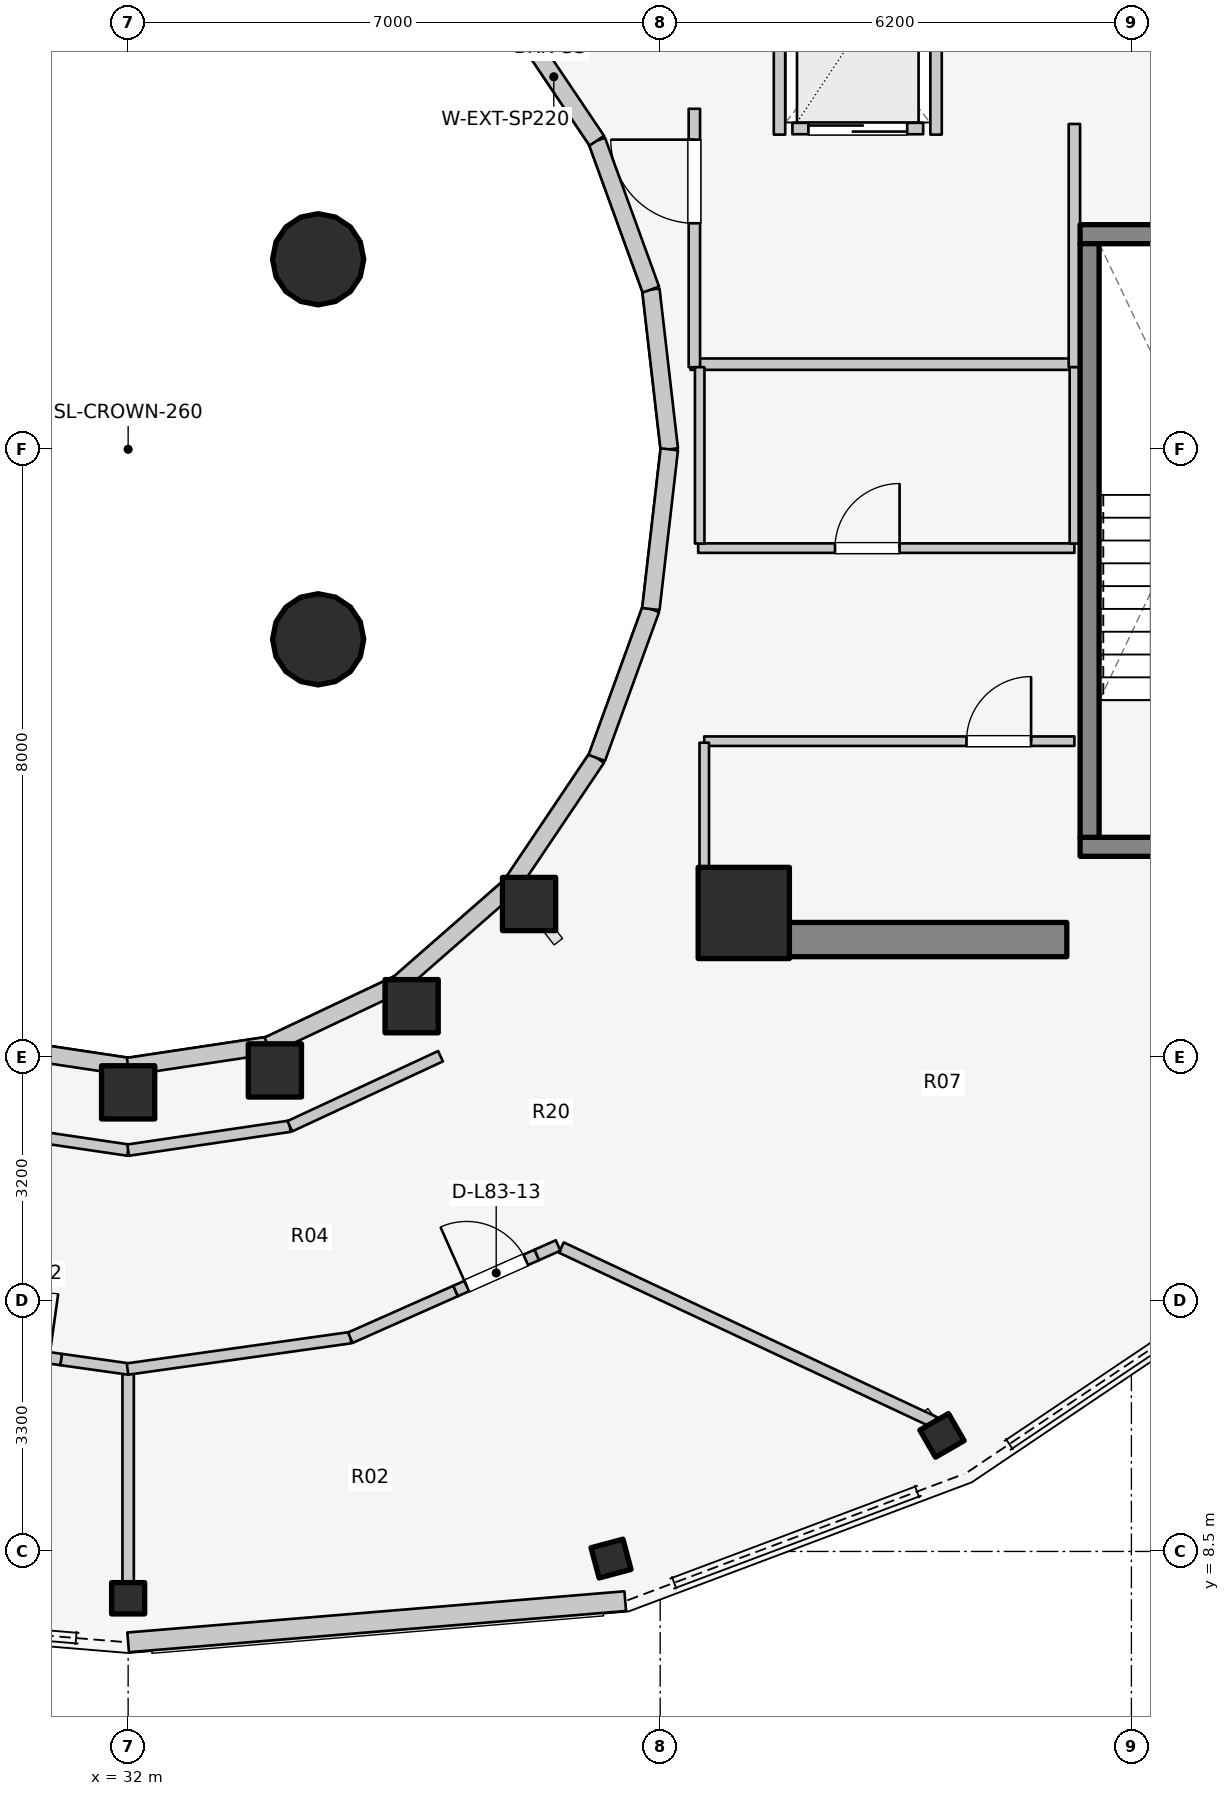
"""IFC4 building model, lengths in metres.
Left out: names, types, materials, properties, quantities, classifications, styles, units other than length and angle.
Written with IfcOpenShell. Run it as: python <this file> out.ifc"""

import sys

from ifc_helpers import new_model, si_unit, direction, frame, frame_2d, origin, origin_2d, place, context, subcontext, project, spatial, rectangle, hollow_circle, i_section, extrude, element, fill, save


model = new_model("IFC4")
c1 = context("Model", 3, precision=1e-05, world=origin(), true_north=direction((0.0, 1.0)))
c2 = subcontext(c1, "Body", "Model", "MODEL_VIEW")
j1 = project(units=[si_unit("LENGTHUNIT", "METRE"), si_unit("PLANEANGLEUNIT", "RADIAN")], contexts=[c1])
p1 = place(None, origin())
s1 = spatial("IfcSite", under=j1, at=p1, CompositionType="ELEMENT")
p2 = place(p1, origin())
s2 = spatial("IfcBuilding", under=s1, at=p2, CompositionType="ELEMENT")
p3 = place(p2, frame((0.0, 0.0, 273.2)))
s3 = spatial("IfcBuildingStorey", under=s2, at=p3, CompositionType="ELEMENT", Elevation=273.2)
p4 = place(p3, frame((39.85, 16.55, 0.0), z_axis=(0.0, 0.0, 1.0), x_axis=(1.0, 0.0, 0.0)))
e1 = element("IfcWall", 1, at=p4, inside=s3, PredefinedType="SHEAR", context=c2, shape_type="SweptSolid", body=[
    extrude(rectangle(XDim=4.5, YDim=0.45, at=frame_2d((2.25, 0.0))), origin(), (0.0, 0.0, 1.0), 3.2),
])
p5 = place(p3, frame((44.525, 17.77, 0.0), z_axis=(0.0, 0.0, 1.0), x_axis=(1.0, 0.0, 0.0)))
e2 = element("IfcWall", 2, at=p5, inside=s3, PredefinedType="SOLIDWALL", context=c2, shape_type="SweptSolid", body=[
    extrude(rectangle(XDim=3.37, YDim=0.25, at=frame_2d((1.685, 0.0))), origin(), (0.0, 0.0, 1.0), 3.2),
])
p6 = place(p5, frame((1.135, 0.0, 0.0)))
e3 = element("IfcOpeningElement", 3, at=p6, cuts=e2, PredefinedType="OPENING", context=c2, shape_type="SweptSolid", body=[
    extrude(rectangle(XDim=1.1, YDim=2.1, at=frame_2d((0.55, 1.05))), frame((0.0, 0.135, 0.0), z_axis=(0.0, -1.0, 0.0), x_axis=(1.0, 0.0, 0.0)), (0.0, 0.0, 1.0), 0.27),
])
p7 = place(p3, frame((44.525, 25.83, 0.0), z_axis=(0.0, 0.0, 1.0), x_axis=(1.0, 0.0, 0.0)))
e4 = element("IfcWall", 4, at=p7, inside=s3, PredefinedType="SOLIDWALL", context=c2, shape_type="SweptSolid", body=[
    extrude(rectangle(XDim=3.37, YDim=0.25, at=frame_2d((1.685, 0.0))), origin(), (0.0, 0.0, 1.0), 3.2),
])
p8 = place(p3, frame((44.65, 17.895, 0.0), z_axis=(0.0, 0.0, 1.0), x_axis=(0.0, 1.0, 0.0)))
e5 = element("IfcWall", 5, at=p8, inside=s3, PredefinedType="SOLIDWALL", context=c2, shape_type="SweptSolid", body=[
    extrude(rectangle(XDim=7.81, YDim=0.25, at=frame_2d((3.905, 0.0))), origin(), (0.0, 0.0, 1.0), 3.2),
])
p9 = place(p3, frame((40.1, 16.9, 0.0), z_axis=(0.0, 0.0, 1.0), x_axis=(1.0, 0.0, 0.0)))
e6 = element("IfcColumn", 6, at=p9, inside=s3, PredefinedType="COLUMN", context=c2, shape_type="SweptSolid", body=[
    extrude(rectangle(XDim=1.2, YDim=1.2, at=origin_2d()), origin(), (0.0, 0.0, 1.0), 3.2),
])
p10 = place(p3, frame((32.0, 14.54, 0.0), z_axis=(0.0, 0.0, 1.0), x_axis=(1.0, 0.0, 0.0)))
e7 = element("IfcColumn", 7, at=p10, inside=s3, PredefinedType="COLUMN", context=c2, shape_type="SweptSolid", body=[
    extrude(rectangle(XDim=0.7, YDim=0.7, at=origin_2d()), origin(), (0.0, 0.0, 1.0), 3.2),
])
p11 = place(p3, frame((32.0, 7.884, 0.0), z_axis=(0.0, 0.0, 1.0), x_axis=(0.0, -1.0, 0.0)))
e8 = element("IfcColumn", 8, at=p11, inside=s3, PredefinedType="COLUMN", context=c2, shape_type="SweptSolid", body=[
    extrude(i_section(OverallWidth=0.412, OverallDepth=0.435, WebThickness=0.036, FlangeThickness=0.057, FilletRadius=0.025, at=origin_2d()), origin(), (0.0, 0.0, 1.0), 3.2),
])
p12 = place(p3, frame((33.931, 14.828, 0.0), z_axis=(0.0, 0.0, 1.0), x_axis=(1.0, 0.0, 0.0)))
e9 = element("IfcColumn", 9, at=p12, inside=s3, PredefinedType="COLUMN", context=c2, shape_type="SweptSolid", body=[
    extrude(rectangle(XDim=0.7, YDim=0.7, at=origin_2d()), origin(), (0.0, 0.0, 1.0), 3.2),
])
p13 = place(p3, frame((38.354, 8.406, 0.0), z_axis=(0.0, 0.0, 1.0), x_axis=(0.258819045103, -0.965925826289, 0.0)))
e10 = element("IfcColumn", 10, at=p13, inside=s3, PredefinedType="COLUMN", context=c2, shape_type="SweptSolid", body=[
    extrude(i_section(OverallWidth=0.412, OverallDepth=0.435, WebThickness=0.036, FlangeThickness=0.057, FilletRadius=0.025, at=origin_2d()), origin(), (0.0, 0.0, 1.0), 3.2),
])
p14 = place(p3, frame((35.73, 15.673, 0.0), z_axis=(0.0, 0.0, 1.0), x_axis=(1.0, 0.0, 0.0)))
e11 = element("IfcColumn", 11, at=p14, inside=s3, PredefinedType="COLUMN", context=c2, shape_type="SweptSolid", body=[
    extrude(rectangle(XDim=0.7, YDim=0.7, at=origin_2d()), origin(), (0.0, 0.0, 1.0), 3.2),
])
p15 = place(p3, frame((42.708, 10.027, 0.0), z_axis=(0.0, 0.0, 1.0), x_axis=(0.5, -0.866025403784, 0.0)))
e12 = element("IfcColumn", 12, at=p15, inside=s3, PredefinedType="COLUMN", context=c2, shape_type="SweptSolid", body=[
    extrude(i_section(OverallWidth=0.412, OverallDepth=0.435, WebThickness=0.036, FlangeThickness=0.057, FilletRadius=0.025, at=origin_2d()), origin(), (0.0, 0.0, 1.0), 3.2),
])
p16 = place(p3, frame((37.275, 17.018, 0.0), z_axis=(0.0, 0.0, 1.0), x_axis=(1.0, 0.0, 0.0)))
e13 = element("IfcColumn", 13, at=p16, inside=s3, PredefinedType="COLUMN", context=c2, shape_type="SweptSolid", body=[
    extrude(rectangle(XDim=0.7, YDim=0.7, at=origin_2d()), origin(), (0.0, 0.0, 1.0), 3.2),
])
for number, where, z_axis, x_axis in (
    (14, (34.5, 20.5, 0.0), (0.0, 0.0, 1.0), (1.0, 0.0, 0.0)),
    (15, (34.5, 25.5, 0.0), (0.0, 0.0, 1.0), (1.0, 0.0, 0.0)),
):
    element("IfcColumn", number, at=place(p3, frame(where, z_axis=z_axis, x_axis=x_axis)), inside=s3, PredefinedType="PILASTER", context=c2, shape_type="SweptSolid", body=[
        extrude(hollow_circle(Radius=0.6, WallThickness=0.032, at=origin_2d()), origin(), (0.0, 0.0, 1.0), 3.2),
    ])
p17 = place(p3, frame((39.12, 23.0, 0.0), z_axis=(0.0, 0.0, 1.0), x_axis=(-0.114711713601, 0.993398823617, 0.0)))
e16 = element("IfcWall", 16, at=p17, inside=s3, PredefinedType="STANDARD", context=c2, shape_type="SweptSolid", body=[
    extrude(rectangle(XDim=2.115, YDim=0.23, at=frame_2d((1.058, 0.0))), origin(), (0.0, 0.0, 1.0), 2.9),
])
p18 = place(p3, frame((38.877, 25.102, 0.0), z_axis=(0.0, 0.0, 1.0), x_axis=(-0.341423187295, 0.93990968033, 0.0)))
e17 = element("IfcWall", 17, at=p18, inside=s3, PredefinedType="STANDARD", context=c2, shape_type="SweptSolid", body=[
    extrude(rectangle(XDim=2.084, YDim=0.23, at=frame_2d((1.042, 0.0))), origin(), (0.0, 0.0, 1.0), 2.9),
])
p19 = place(p3, frame((38.166, 27.06, 0.0), z_axis=(0.0, 0.0, 1.0), x_axis=(-0.558197800898, 0.829707909492, 0.0)))
e18 = element("IfcWall", 18, at=p19, inside=s3, PredefinedType="STANDARD", context=c2, shape_type="SweptSolid", body=[
    extrude(rectangle(XDim=2.027, YDim=0.23, at=frame_2d((1.013, 0.0))), origin(), (0.0, 0.0, 1.0), 1.32),
])
for number, where, z_axis, x_axis in (
    (19, (30.157, 15.157, 0.0), (0.0, 0.0, 1.0), (0.989, -0.149, 0.0)),
    (20, (32.0, 14.88, 0.0), (0.0, 0.0, 1.0), (0.989, 0.149, 0.0)),
):
    element("IfcWall", number, at=place(p3, frame(where, z_axis=z_axis, x_axis=x_axis)), inside=s3, PredefinedType="STANDARD", context=c2, shape_type="SweptSolid", body=[
        extrude(rectangle(XDim=1.864, YDim=0.23, at=frame_2d((0.932, 0.0))), origin(), (0.0, 0.0, 1.0), 1.32),
    ])
p20 = place(p3, frame((33.843, 15.157, 0.0), z_axis=(0.0, 0.0, 1.0), x_axis=(0.904179699603, 0.427152280606, 0.0)))
e21 = element("IfcWall", 21, at=p20, inside=s3, PredefinedType="STANDARD", context=c2, shape_type="SweptSolid", body=[
    extrude(rectangle(XDim=1.899, YDim=0.23, at=frame_2d((0.95, 0.0))), origin(), (0.0, 0.0, 1.0), 1.32),
])
p21 = place(p3, frame((35.56, 15.968, 0.0), z_axis=(0.0, 0.0, 1.0), x_axis=(0.752576694707, 0.658504607869, 0.0)))
e22 = element("IfcWall", 22, at=p21, inside=s3, PredefinedType="STANDARD", context=c2, shape_type="SweptSolid", body=[
    extrude(rectangle(XDim=1.959, YDim=0.23, at=frame_2d((0.98, 0.0))), origin(), (0.0, 0.0, 1.0), 1.32),
])
p22 = place(p3, frame((37.035, 17.258, 0.0), z_axis=(0.0, 0.0, 1.0), x_axis=(0.558197800898, 0.829707909492, 0.0)))
e23 = element("IfcWall", 23, at=p22, inside=s3, PredefinedType="STANDARD", context=c2, shape_type="SweptSolid", body=[
    extrude(rectangle(XDim=2.027, YDim=0.23, at=frame_2d((1.013, 0.0))), origin(), (0.0, 0.0, 1.0), 1.32),
])
p23 = place(p3, frame((38.166, 18.94, 0.0), z_axis=(0.0, 0.0, 1.0), x_axis=(0.341423187295, 0.93990968033, 0.0)))
e24 = element("IfcWall", 24, at=p23, inside=s3, PredefinedType="STANDARD", context=c2, shape_type="SweptSolid", body=[
    extrude(rectangle(XDim=2.084, YDim=0.23, at=frame_2d((1.042, 0.0))), origin(), (0.0, 0.0, 1.0), 2.9),
])
p24 = place(p3, frame((38.877, 20.898, 0.0), z_axis=(0.0, 0.0, 1.0), x_axis=(0.114711713601, 0.993398823617, 0.0)))
e25 = element("IfcWall", 25, at=p24, inside=s3, PredefinedType="STANDARD", context=c2, shape_type="SweptSolid", body=[
    extrude(rectangle(XDim=2.115, YDim=0.23, at=frame_2d((1.058, 0.0))), origin(), (0.0, 0.0, 1.0), 2.9),
])
p25 = place(p3, frame((32.0, 7.304, 0.0), z_axis=(0.0, 0.0, 1.0), x_axis=(0.996580817631, 0.082623688677, 0.0)))
e26 = element("IfcWall", 26, at=p25, inside=s3, PredefinedType="STANDARD", context=c2, shape_type="SweptSolid", body=[
    extrude(rectangle(XDim=6.563, YDim=0.26, at=frame_2d((3.281, 0.0))), origin(), (0.0, 0.0, 1.0), 1.32),
])
p26 = place(p3, frame((40.74, 27.22, 0.0), z_axis=(0.0, 0.0, 1.0), x_axis=(1.0, 0.0, 0.0)))
e27 = element("IfcWall", 27, at=p26, inside=s3, PredefinedType="SOLIDWALL", context=c2, shape_type="SweptSolid", body=[
    extrude(rectangle(XDim=1.72, YDim=0.15, at=frame_2d((0.86, 0.0))), origin(), (0.0, 0.0, 1.0), 2.915),
])
p27 = place(p26, frame((0.21, 0.0, 0.0)))
e28 = element("IfcOpeningElement", 28, at=p27, cuts=e27, PredefinedType="OPENING", context=c2, shape_type="SweptSolid", body=[
    extrude(rectangle(XDim=1.3, YDim=2.1, at=frame_2d((0.65, 1.05))), frame((0.0, 0.085, 0.0), z_axis=(0.0, -1.0, 0.0), x_axis=(1.0, 0.0, 0.0)), (0.0, 0.0, 1.0), 0.17),
])
for number, where, z_axis, x_axis in (
    (29, (40.57, 27.14, 0.0), (0.0, 0.0, 1.0), (0.0, 1.0, 0.0)),
    (30, (42.63, 27.14, 0.0), (0.0, 0.0, 1.0), (0.0, 1.0, 0.0)),
):
    element("IfcWall", number, at=place(p3, frame(where, z_axis=z_axis, x_axis=x_axis)), inside=s3, PredefinedType="SOLIDWALL", context=c2, shape_type="SweptSolid", body=[
        extrude(rectangle(XDim=2.72, YDim=0.15, at=frame_2d((1.36, 0.0))), origin(), (0.0, 0.0, 1.0), 2.915),
    ])
p28 = place(p3, frame((39.4, 24.12, 0.0), z_axis=(0.0, 0.0, 1.0), x_axis=(1.0, 0.0, 0.0)))
e31 = element("IfcWall", 31, at=p28, inside=s3, PredefinedType="PARTITIONING", context=c2, shape_type="SweptSolid", body=[
    extrude(rectangle(XDim=5.08, YDim=0.15, at=frame_2d((2.54, 0.0))), origin(), (0.0, 0.0, 1.0), 2.22),
])
p29 = place(p3, frame((44.45, 24.08, 0.0), z_axis=(0.0, 0.0, 1.0), x_axis=(0.0, 1.0, 0.0)))
e32 = element("IfcWall", 32, at=p29, inside=s3, PredefinedType="PARTITIONING", context=c2, shape_type="SweptSolid", body=[
    extrude(rectangle(XDim=3.2, YDim=0.15, at=frame_2d((1.6, 0.0))), origin(), (0.0, 0.0, 1.0), 2.915),
])
p30 = place(p3, frame((39.45, 24.08, 0.0), z_axis=(0.0, 0.0, 1.0), x_axis=(0.0, 1.0, 0.0)))
e33 = element("IfcWall", 33, at=p30, inside=s3, PredefinedType="PARTITIONING", context=c2, shape_type="SweptSolid", body=[
    extrude(rectangle(XDim=3.4, YDim=0.15, at=frame_2d((1.7, 0.0))), origin(), (0.0, 0.0, 1.0), 2.915),
])
p31 = place(p30, frame((1.894, 0.0, 0.0)))
e34 = element("IfcOpeningElement", 34, at=p31, cuts=e33, PredefinedType="OPENING", context=c2, shape_type="SweptSolid", body=[
    extrude(rectangle(XDim=1.1, YDim=2.1, at=frame_2d((0.55, 1.05))), frame((0.0, 0.085, 0.0), z_axis=(0.0, -1.0, 0.0), x_axis=(1.0, 0.0, 0.0)), (0.0, 0.0, 1.0), 0.17),
])
p32 = place(p3, frame((39.58, 19.16, 0.0), z_axis=(0.0, 0.0, 1.0), x_axis=(1.0, 0.0, 0.0)))
e35 = element("IfcWall", 35, at=p32, inside=s3, PredefinedType="PARTITIONING", context=c2, shape_type="SweptSolid", body=[
    extrude(rectangle(XDim=4.87, YDim=0.125, at=frame_2d((2.435, 0.0))), origin(), (0.0, 0.0, 1.0), 2.22),
])
p33 = place(p32, frame((3.45, 0.0, 0.0)))
e36 = element("IfcOpeningElement", 36, at=p33, cuts=e35, PredefinedType="OPENING", context=c2, shape_type="SweptSolid", body=[
    extrude(rectangle(XDim=0.85, YDim=2.05, at=frame_2d((0.425, 1.025))), frame((0.0, 0.073, 0.0), z_axis=(0.0, -1.0, 0.0), x_axis=(1.0, 0.0, 0.0)), (0.0, 0.0, 1.0), 0.145),
])
p34 = place(p3, frame((39.58, 17.1, 0.0), z_axis=(0.0, 0.0, 1.0), x_axis=(0.0, 1.0, 0.0)))
e37 = element("IfcWall", 37, at=p34, inside=s3, PredefinedType="PARTITIONING", context=c2, shape_type="SweptSolid", body=[
    extrude(rectangle(XDim=2.04, YDim=0.125, at=frame_2d((1.02, 0.0))), origin(), (0.0, 0.0, 1.0), 2.491),
])
p35 = place(p3, frame((39.5, 21.7, 0.0), z_axis=(0.0, 0.0, 1.0), x_axis=(1.0, 0.0, 0.0)))
e38 = element("IfcWall", 38, at=p35, inside=s3, PredefinedType="PARTITIONING", context=c2, shape_type="SweptSolid", body=[
    extrude(rectangle(XDim=4.95, YDim=0.125, at=frame_2d((2.475, 0.0))), origin(), (0.0, 0.0, 1.0), 2.22),
])
p36 = place(p35, frame((1.8, 0.0, 0.0)))
e39 = element("IfcOpeningElement", 39, at=p36, cuts=e38, PredefinedType="OPENING", context=c2, shape_type="SweptSolid", body=[
    extrude(rectangle(XDim=0.85, YDim=2.05, at=frame_2d((0.425, 1.025))), frame((0.0, 0.073, 0.0), z_axis=(0.0, -1.0, 0.0), x_axis=(1.0, 0.0, 0.0)), (0.0, 0.0, 1.0), 0.145),
])
for number, where, z_axis, x_axis in (
    (40, (39.52, 21.76, 0.0), (0.0, 0.0, 1.0), (0.0, 1.0, 0.0)),
    (41, (44.45, 21.76, 0.0), (0.0, 0.0, 1.0), (0.0, 1.0, 0.0)),
):
    element("IfcWall", number, at=place(p3, frame(where, z_axis=z_axis, x_axis=x_axis)), inside=s3, PredefinedType="PARTITIONING", context=c2, shape_type="SweptSolid", body=[
        extrude(rectangle(XDim=2.32, YDim=0.125, at=frame_2d((1.16, 0.0))), origin(), (0.0, 0.0, 1.0), 2.915),
    ])
for number, where, z_axis, x_axis in (
    (42, (29.873, 14.094, 0.0), (0.0, 0.0, 1.0), (0.989, -0.146, 0.0)),
    (43, (32.0, 13.78, 0.0), (0.0, 0.0, 1.0), (0.989, 0.146, 0.0)),
):
    element("IfcWall", number, at=place(p3, frame(where, z_axis=z_axis, x_axis=x_axis)), inside=s3, PredefinedType="PARTITIONING", context=c2, shape_type="SweptSolid", body=[
        extrude(rectangle(XDim=2.151, YDim=0.15, at=frame_2d((1.075, 0.0))), origin(), (0.0, 0.0, 1.0), 1.32),
    ])
p37 = place(p3, frame((34.127, 14.094, 0.0), z_axis=(0.0, 0.0, 1.0), x_axis=(0.906943449489, 0.421252393975, 0.0)))
e44 = element("IfcWall", 44, at=p37, inside=s3, PredefinedType="PARTITIONING", context=c2, shape_type="SweptSolid", body=[
    extrude(rectangle(XDim=2.186, YDim=0.15, at=frame_2d((1.093, 0.0))), origin(), (0.0, 0.0, 1.0), 1.32),
])
p38 = place(p3, frame((32.0, 10.845, 0.0), z_axis=(0.0, 0.0, 1.0), x_axis=(0.0, -1.0, 0.0)))
e45 = element("IfcWall", 45, at=p38, inside=s3, PredefinedType="PARTITIONING", context=c2, shape_type="SweptSolid", body=[
    extrude(rectangle(XDim=2.761, YDim=0.15, at=frame_2d((1.38, 0.0))), origin(), (0.0, 0.0, 1.0), 1.32),
])
p39 = place(p3, frame((37.7, 12.498, 0.0), z_axis=(0.0, 0.0, 1.0), x_axis=(0.90567955352, -0.423962906793, 0.0)))
e46 = element("IfcWall", 46, at=p39, inside=s3, PredefinedType="PARTITIONING", context=c2, shape_type="SweptSolid", body=[
    extrude(rectangle(XDim=5.419, YDim=0.15, at=frame_2d((2.71, 0.0))), origin(), (0.0, 0.0, 1.0), 1.32),
])
p40 = place(p3, frame((29.961, 11.188, 0.0), z_axis=(0.0, 0.0, 1.0), x_axis=(0.990239487993, -0.139376312259, 0.0)))
e47 = element("IfcWall", 47, at=p40, inside=s3, PredefinedType="PARTITIONING", context=c2, shape_type="SweptSolid", body=[
    extrude(rectangle(XDim=1.17, YDim=0.15, at=frame_2d((0.585, 0.0))), origin(), (0.0, 0.0, 1.0), 2.445),
])
p41 = place(p40, frame((0.16, 0.0, 0.0)))
e48 = element("IfcOpeningElement", 48, at=p41, cuts=e47, PredefinedType="OPENING", context=c2, shape_type="SweptSolid", body=[
    extrude(rectangle(XDim=0.85, YDim=2.05, at=frame_2d((0.425, 1.025))), frame((0.0, 0.085, 0.0), z_axis=(0.0, -1.0, 0.0), x_axis=(1.0, 0.0, 0.0)), (0.0, 0.0, 1.0), 0.17),
])
p42 = place(p3, frame((31.12, 11.025, 0.0), z_axis=(0.0, 0.0, 1.0), x_axis=(0.99023074259, -0.1394384324, 0.0)))
e49 = element("IfcWall", 49, at=p42, inside=s3, PredefinedType="PARTITIONING", context=c2, shape_type="SweptSolid", body=[
    extrude(rectangle(XDim=0.896, YDim=0.15, at=frame_2d((0.448, 0.0))), origin(), (0.0, 0.0, 1.0), 1.32),
])
p43 = place(p3, frame((31.992, 10.9, 0.0), z_axis=(0.0, 0.0, 1.0), x_axis=(0.990247167887, 0.139321737324, 0.0)))
e50 = element("IfcWall", 50, at=p43, inside=s3, PredefinedType="PARTITIONING", context=c2, shape_type="SweptSolid", body=[
    extrude(rectangle(XDim=2.963, YDim=0.15, at=frame_2d((1.481, 0.0))), origin(), (0.0, 0.0, 1.0), 1.32),
])
p44 = place(p3, frame((34.923, 11.312, 0.0), z_axis=(0.0, 0.0, 1.0), x_axis=(0.914037268574, 0.405630215416, 0.0)))
e51 = element("IfcWall", 51, at=p44, inside=s3, PredefinedType="PARTITIONING", context=c2, shape_type="SweptSolid", body=[
    extrude(rectangle(XDim=1.516, YDim=0.15, at=frame_2d((0.758, 0.0))), origin(), (0.0, 0.0, 1.0), 1.32),
])
p45 = place(p3, frame((36.308, 11.927, 0.0), z_axis=(0.0, 0.0, 1.0), x_axis=(0.913940571896, 0.405848039347, 0.0)))
e52 = element("IfcWall", 52, at=p45, inside=s3, PredefinedType="PARTITIONING", context=c2, shape_type="SweptSolid", body=[
    extrude(rectangle(XDim=1.17, YDim=0.15, at=frame_2d((0.585, 0.0))), origin(), (0.0, 0.0, 1.0), 2.11),
])
p46 = place(p45, frame((0.16, 0.0, 0.0)))
e53 = element("IfcOpeningElement", 53, at=p46, cuts=e52, PredefinedType="OPENING", context=c2, shape_type="SweptSolid", body=[
    extrude(rectangle(XDim=0.85, YDim=2.05, at=frame_2d((0.425, 1.025))), frame((0.0, 0.085, 0.0), z_axis=(0.0, -1.0, 0.0), x_axis=(1.0, 0.0, 0.0)), (0.0, 0.0, 1.0), 0.17),
])
p47 = place(p3, frame((37.377, 12.401, 0.0), z_axis=(0.0, 0.0, 1.0), x_axis=(0.91394327808, 0.405841945161, 0.0)))
e54 = element("IfcWall", 54, at=p47, inside=s3, PredefinedType="PARTITIONING", context=c2, shape_type="SweptSolid", body=[
    extrude(rectangle(XDim=0.306, YDim=0.15, at=frame_2d((0.153, 0.0))), origin(), (0.0, 0.0, 1.0), 2.915),
])
p48 = place(p27, origin())
e55 = element("IfcDoor", 55, at=p48, inside=s3, OperationType="DOUBLE_DOOR_SLIDING", PredefinedType="DOOR", context=c2, shape_type="SweptSolid", body=[
    extrude(rectangle(XDim=1.3, YDim=2.1, at=frame_2d((0.65, 1.05))), frame((0.0, 0.025, 0.0), z_axis=(0.0, -1.0, 0.0), x_axis=(1.0, 0.0, 0.0)), (0.0, 0.0, 1.0), 0.05),
])
fill(e28, e55)
p49 = place(p31, origin())
e56 = element("IfcDoor", 56, at=p49, inside=s3, OperationType="SINGLE_SWING_RIGHT", PredefinedType="DOOR", context=c2, shape_type="SweptSolid", body=[
    extrude(rectangle(XDim=1.1, YDim=2.1, at=frame_2d((0.55, 1.05))), frame((0.0, 0.025, 0.0), z_axis=(0.0, -1.0, 0.0), x_axis=(1.0, 0.0, 0.0)), (0.0, 0.0, 1.0), 0.05),
])
fill(e34, e56)
p50 = place(p33, origin())
e57 = element("IfcDoor", 57, at=p50, inside=s3, OperationType="SINGLE_SWING_RIGHT", PredefinedType="DOOR", context=c2, shape_type="SweptSolid", body=[
    extrude(rectangle(XDim=0.85, YDim=2.05, at=frame_2d((0.425, 1.025))), frame((0.0, 0.025, 0.0), z_axis=(0.0, -1.0, 0.0), x_axis=(1.0, 0.0, 0.0)), (0.0, 0.0, 1.0), 0.05),
])
fill(e36, e57)
p51 = place(p36, origin())
e58 = element("IfcDoor", 58, at=p51, inside=s3, OperationType="SINGLE_SWING_RIGHT", PredefinedType="DOOR", context=c2, shape_type="SweptSolid", body=[
    extrude(rectangle(XDim=0.85, YDim=2.05, at=frame_2d((0.425, 1.025))), frame((0.0, 0.025, 0.0), z_axis=(0.0, -1.0, 0.0), x_axis=(1.0, 0.0, 0.0)), (0.0, 0.0, 1.0), 0.05),
])
fill(e39, e58)
p52 = place(p46, origin())
e59 = element("IfcDoor", 59, at=p52, inside=s3, OperationType="SINGLE_SWING_LEFT", PredefinedType="DOOR", context=c2, shape_type="SweptSolid", body=[
    extrude(rectangle(XDim=0.85, YDim=2.05, at=frame_2d((0.425, 1.025))), frame((0.0, 0.025, 0.0), z_axis=(0.0, -1.0, 0.0), x_axis=(1.0, 0.0, 0.0)), (0.0, 0.0, 1.0), 0.05),
])
fill(e53, e59)
save(model, sys.argv[1])
